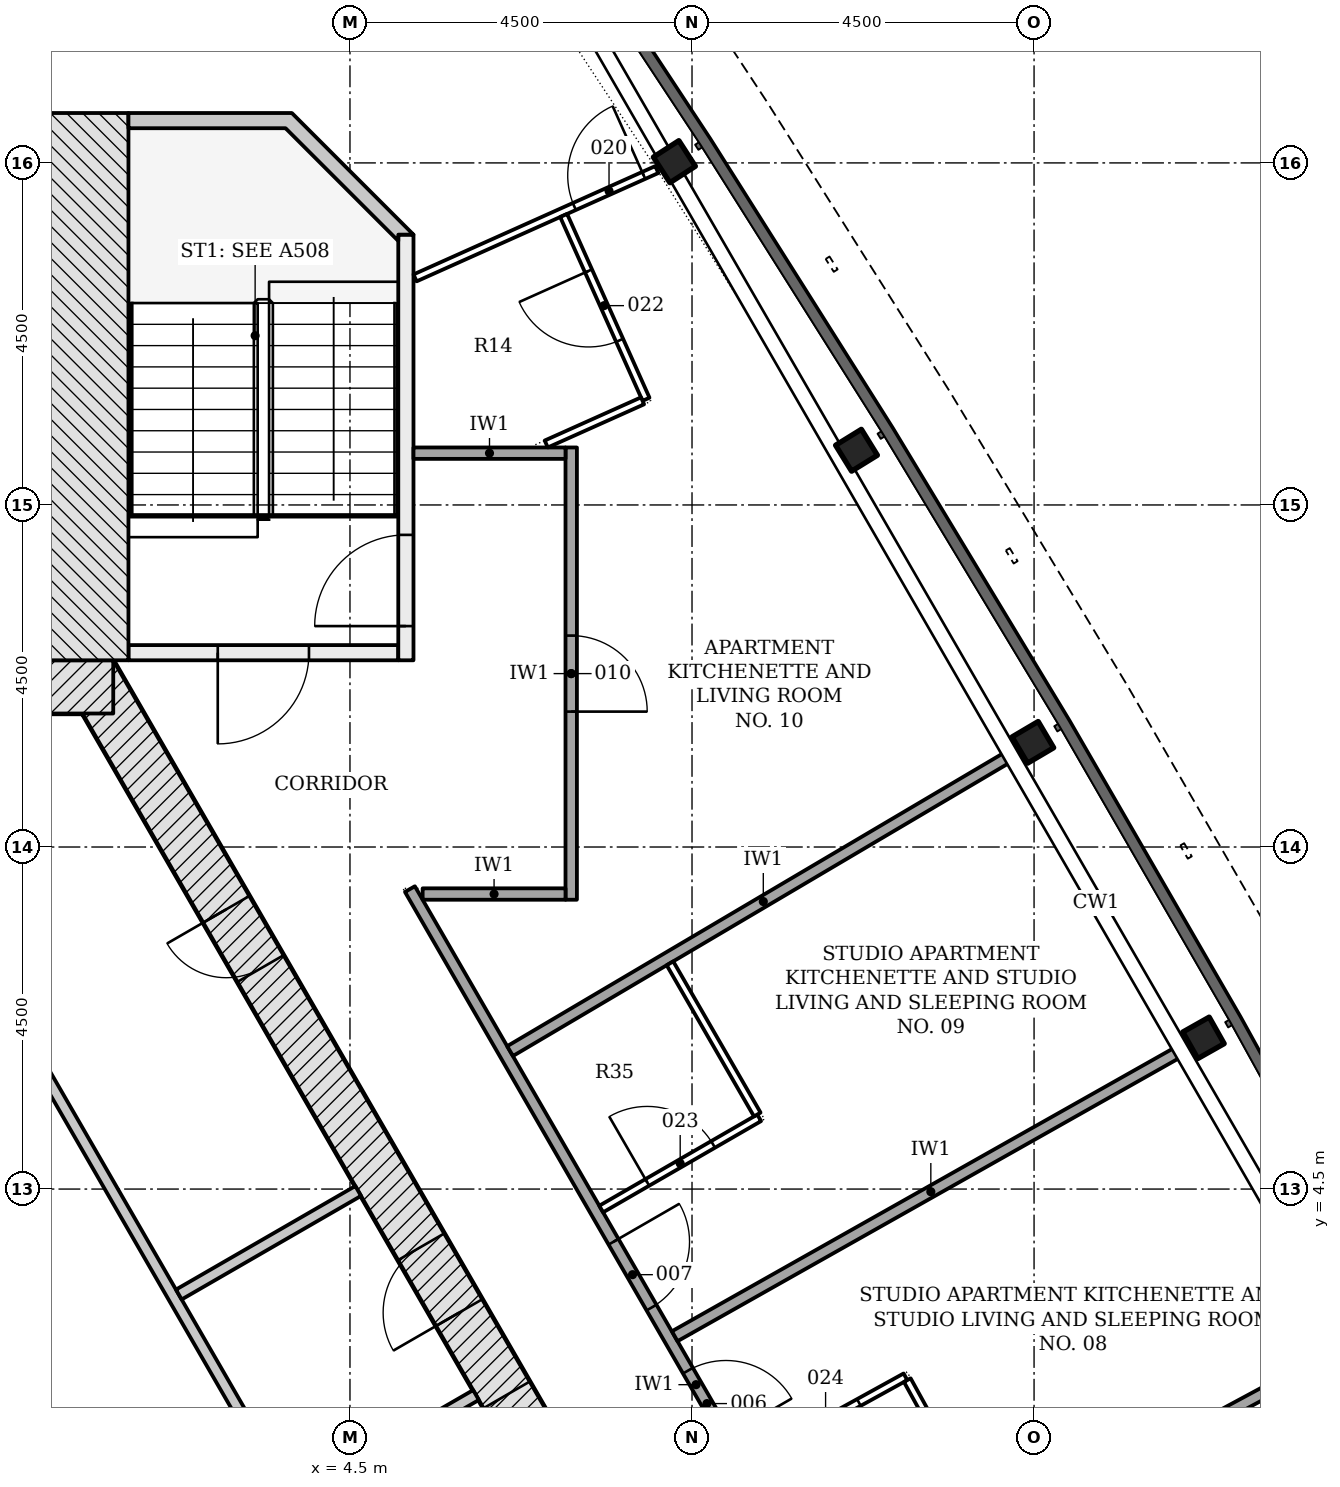
"""IFC4 building model, lengths in metres.
Left out: names, types, materials, properties, quantities, classifications, styles, units other than length and angle.
Written with IfcOpenShell. Run it as: python <this file> out.ifc"""

import sys

from ifc_helpers import new_model, si_unit, direction, frame, frame_2d, origin, origin_2d, place, context, subcontext, project, spatial, polyline, rectangle, i_section, outline, extrude, element, fill, save


model = new_model("IFC4")
c1 = context("Model", 3, precision=1e-05, world=origin(), true_north=direction((0.0, 1.0)))
c2 = subcontext(c1, "Body", "Model", "MODEL_VIEW")
j1 = project(units=[si_unit("LENGTHUNIT", "METRE"), si_unit("PLANEANGLEUNIT", "RADIAN")], contexts=[c1])
p1 = place(None, origin())
s1 = spatial("IfcSite", under=j1, at=p1, CompositionType="ELEMENT")
p2 = place(p1, origin())
s2 = spatial("IfcBuilding", under=s1, at=p2, CompositionType="ELEMENT")
p3 = place(p2, frame((0.0, 0.0, 98.7)))
s3 = spatial("IfcBuildingStorey", under=s2, at=p3, CompositionType="ELEMENT", Elevation=98.7)
p4 = place(p3, frame((10.311, -4.703, -0.2), z_axis=(0.0, 0.0, 1.0), x_axis=(-0.500001446645, 0.866024568562, 0.0)))
e1 = element("IfcWall", 1, at=p4, inside=s3, PredefinedType="SHEAR", context=c2, shape_type="SweptSolid", body=[
    extrude(rectangle(XDim=18.458, YDim=0.7, at=frame_2d((9.229, 0.0))), origin(), (0.0, 0.0, 1.0), 3.6),
])
p5 = place(p4, frame((6.5, 0.0, 0.2)))
e2 = element("IfcOpeningElement", 2, at=p5, cuts=e1, PredefinedType="OPENING", context=c2, shape_type="SweptSolid", body=[
    extrude(rectangle(XDim=1.0, YDim=2.1, at=frame_2d((0.5, 1.05))), frame((0.0, 0.36, 0.0), z_axis=(0.0, -1.0, 0.0), x_axis=(1.0, 0.0, 0.0)), (0.0, 0.0, 1.0), 0.72),
])
p6 = place(p4, frame((2.902, 0.0, 0.2)))
e3 = element("IfcOpeningElement", 3, at=p6, cuts=e1, PredefinedType="OPENING", context=c2, shape_type="SweptSolid", body=[
    extrude(rectangle(XDim=0.9, YDim=2.1, at=frame_2d((0.45, 1.05))), frame((0.0, 0.36, 0.0), z_axis=(0.0, -1.0, 0.0), x_axis=(1.0, 0.0, 0.0)), (0.0, 0.0, 1.0), 0.72),
])
p7 = place(p4, frame((8.75, 0.0, 0.2)))
e4 = element("IfcOpeningElement", 4, at=p7, cuts=e1, PredefinedType="OPENING", context=c2, shape_type="SweptSolid", body=[
    extrude(rectangle(XDim=1.0, YDim=2.1, at=frame_2d((0.5, 1.05))), frame((0.0, 0.36, 0.0), z_axis=(0.0, -1.0, 0.0), x_axis=(1.0, 0.0, 0.0)), (0.0, 0.0, 1.0), 0.72),
])
p8 = place(p4, frame((13.977, 0.0, 0.2)))
e5 = element("IfcOpeningElement", 5, at=p8, cuts=e1, PredefinedType="OPENING", context=c2, shape_type="SweptSolid", body=[
    extrude(rectangle(XDim=0.9, YDim=2.1, at=frame_2d((0.45, 1.05))), frame((0.0, 0.36, 0.0), z_axis=(0.0, -1.0, 0.0), x_axis=(1.0, 0.0, 0.0)), (0.0, 0.0, 1.0), 0.72),
])
p9 = place(p3, frame((1.386, 11.106, -0.2), z_axis=(0.0, 0.0, 1.0), x_axis=(-1.0, 0.0, 0.0)))
e6 = element("IfcWall", 6, at=p9, inside=s3, PredefinedType="SHEAR", context=c2, shape_type="SweptSolid", body=[
    extrude(rectangle(XDim=2.771, YDim=0.7, at=frame_2d((1.386, 0.0))), origin(), (0.0, 0.0, 1.0), 3.6),
])
for number, where, z_axis, x_axis in (
    (7, (15.729, 6.49, -0.2), (0.0, 0.0, 1.0), (-0.491, 0.871, 0.0)),
    (8, (13.484, 10.377, -0.2), (0.0, 0.0, 1.0), (-0.508, 0.861, 0.0)),
    (9, (11.164, 14.22, -0.2), (0.0, 0.0, 1.0), (-0.525, 0.851, 0.0)),
    (10, (8.768, 18.016, -0.2), (0.0, 0.0, 1.0), (-0.542, 0.84, 0.0)),
):
    element("IfcColumn", number, at=place(p3, frame(where, z_axis=z_axis, x_axis=x_axis)), inside=s3, PredefinedType="COLUMN", context=c2, shape_type="SweptSolid", body=[
        extrude(i_section(OverallWidth=0.401, OverallDepth=0.399, WebThickness=0.025, FlangeThickness=0.04, FilletRadius=0.015, at=origin_2d()), origin(), (0.0, 0.0, 1.0), 3.6),
    ])
p10 = place(p3, frame((-2.854, -3.413, 0.0), z_axis=(0.0, 0.0, 1.0), x_axis=(0.866030102318, 0.499991861813, 0.0)))
e11 = element("IfcWall", 11, at=p10, inside=s3, PredefinedType="PARTITIONING", context=c2, shape_type="SweptSolid", body=[
    extrude(rectangle(XDim=10.407, YDim=0.15, at=frame_2d((5.204, 0.0))), origin(), (0.0, 0.0, 1.0), 3.4),
])
p11 = place(p10, frame((3.354, 0.0, 0.0)))
e12 = element("IfcOpeningElement", 12, at=p11, cuts=e11, PredefinedType="OPENING", context=c2, shape_type="SweptSolid", body=[
    extrude(rectangle(XDim=0.9, YDim=2.1, at=frame_2d((0.45, 1.05))), frame((0.0, 0.085, 0.0), z_axis=(0.0, -1.0, 0.0), x_axis=(1.0, 0.0, 0.0)), (0.0, 0.0, 1.0), 0.17),
])
p12 = place(p3, frame((3.546, 0.715, 0.0), z_axis=(0.0, 0.0, 1.0), x_axis=(-0.50002895357, 0.866008686788, 0.0)))
e13 = element("IfcWall", 13, at=p12, inside=s3, PredefinedType="PARTITIONING", context=c2, shape_type="SweptSolid", body=[
    extrude(rectangle(XDim=6.642, YDim=0.15, at=frame_2d((3.321, 0.0))), origin(), (0.0, 0.0, 1.0), 3.4),
])
p13 = place(p3, frame((2.248, 3.112, 0.0), z_axis=(0.0, 0.0, 1.0), x_axis=(0.866012511928, 0.500022328685, 0.0)))
e14 = element("IfcWall", 14, at=p13, inside=s3, PredefinedType="PARTITIONING", context=c2, shape_type="SweptSolid", body=[
    extrude(rectangle(XDim=2.725, YDim=0.15, at=frame_2d((1.363, 0.0))), origin(), (0.0, 0.0, 1.0), 3.4),
])
p14 = place(p3, frame((5.135, 11.556, -0.2), z_axis=(0.0, 0.0, 1.0), x_axis=(-1.0, 0.0, 0.0)))
e15 = element("IfcWall", 15, at=p14, inside=s3, PredefinedType="SHEAR", context=c2, shape_type="SweptSolid", body=[
    extrude(rectangle(XDim=3.55, YDim=0.2, at=frame_2d((1.775, 0.0))), origin(), (0.0, 0.0, 1.0), 3.6),
])
p15 = place(p14, frame((1.175, 0.0, 0.2)))
e16 = element("IfcOpeningElement", 16, at=p15, cuts=e15, PredefinedType="OPENING", context=c2, shape_type="SweptSolid", body=[
    extrude(rectangle(XDim=1.2, YDim=2.1, at=frame_2d((0.6, 1.05))), frame((0.0, 0.11, 0.0), z_axis=(0.0, -1.0, 0.0), x_axis=(1.0, 0.0, 0.0)), (0.0, 0.0, 1.0), 0.22),
])
p16 = place(p3, frame((5.236, 11.456, -0.2), z_axis=(0.0, 0.0, 1.0), x_axis=(0.0, 1.0, 0.0)))
e17 = element("IfcWall", 17, at=p16, inside=s3, PredefinedType="SHEAR", context=c2, shape_type="SweptSolid", body=[
    extrude(rectangle(XDim=5.6, YDim=0.2, at=frame_2d((2.8, 0.0))), origin(), (0.0, 0.0, 1.0), 3.6),
])
p17 = place(p16, frame((0.45, 0.0, 0.2)))
e18 = element("IfcOpeningElement", 18, at=p17, cuts=e17, PredefinedType="OPENING", context=c2, shape_type="SweptSolid", body=[
    extrude(rectangle(XDim=1.2, YDim=2.1, at=frame_2d((0.6, 1.05))), frame((0.0, 0.11, 0.0), z_axis=(0.0, -1.0, 0.0), x_axis=(1.0, 0.0, 0.0)), (0.0, 0.0, 1.0), 0.22),
])
p18 = place(p3, frame((0.993, 11.456, -0.2), z_axis=(0.0, 0.0, 1.0), x_axis=(0.0, 1.0, 0.0)))
e19 = element("IfcWall", 19, at=p18, inside=s3, PredefinedType="SHEAR", context=c2, shape_type="SweptSolid", body=[
    extrude(rectangle(XDim=7.2, YDim=1.186, at=frame_2d((3.6, 0.0))), origin(), (0.0, 0.0, 1.0), 3.6),
])
p19 = place(p3, frame((0.0, 0.0, -0.2)))
e20 = element("IfcWall", 20, at=p19, inside=s3, PredefinedType="SHEAR", context=c2, shape_type="SweptSolid", body=[
    extrude(outline(polyline([(5.336, 17.056), (3.736, 18.656), (1.586, 18.656), (1.586, 18.456), (3.653, 18.456), (5.135, 16.974), (5.135, 17.056), (5.135, 17.056), (5.135, 17.056), (5.135, 17.056), (5.135, 17.056), (5.135, 17.056), (5.135, 17.056), (5.135, 17.056), (5.135, 17.056), (5.135, 17.056), (5.135, 17.056), (5.135, 17.056), (5.135, 17.056), (5.135, 17.056), (5.135, 17.056), (5.135, 17.056), (5.135, 17.056), (5.336, 17.056)])), origin(), (0.0, 0.0, 1.0), 3.6),
])
p20 = place(p3, frame((5.289, 8.446, 0.0), z_axis=(0.0, 0.0, 1.0), x_axis=(0.499996620721, -0.866027354803, 0.0)))
e21 = element("IfcWall", 21, at=p20, inside=s3, PredefinedType="PARTITIONING", context=c2, shape_type="SweptSolid", body=[
    extrude(rectangle(XDim=15.057, YDim=0.15, at=frame_2d((7.528, 0.0))), origin(), (0.0, 0.0, 1.0), 2.778),
])
p21 = place(p20, frame((12.566, 0.0, 0.0)))
e22 = element("IfcOpeningElement", 22, at=p21, cuts=e21, PredefinedType="OPENING", context=c2, shape_type="SweptSolid", body=[
    extrude(rectangle(XDim=1.0, YDim=2.1, at=frame_2d((0.5, 1.05))), frame((0.0, 0.085, 0.0), z_axis=(0.0, -1.0, 0.0), x_axis=(1.0, 0.0, 0.0)), (0.0, 0.0, 1.0), 0.17),
])
p22 = place(p20, frame((7.316, 0.0, 0.0)))
e23 = element("IfcOpeningElement", 23, at=p22, cuts=e21, PredefinedType="OPENING", context=c2, shape_type="SweptSolid", body=[
    extrude(rectangle(XDim=1.0, YDim=2.1, at=frame_2d((0.5, 1.05))), frame((0.0, 0.085, 0.0), z_axis=(0.0, -1.0, 0.0), x_axis=(1.0, 0.0, 0.0)), (0.0, 0.0, 1.0), 0.17),
])
p23 = place(p20, frame((5.357, 0.0, 0.0)))
e24 = element("IfcOpeningElement", 24, at=p23, cuts=e21, PredefinedType="OPENING", context=c2, shape_type="SweptSolid", body=[
    extrude(rectangle(XDim=1.0, YDim=2.1, at=frame_2d((0.5, 1.05))), frame((0.0, 0.085, 0.0), z_axis=(0.0, -1.0, 0.0), x_axis=(1.0, 0.0, 0.0)), (0.0, 0.0, 1.0), 0.17),
])
p24 = place(p3, frame((7.411, 14.256, 0.0), z_axis=(0.0, 0.0, 1.0), x_axis=(0.0, -1.0, 0.0)))
e25 = element("IfcWall", 25, at=p24, inside=s3, PredefinedType="PARTITIONING", context=c2, shape_type="SweptSolid", body=[
    extrude(rectangle(XDim=5.95, YDim=0.15, at=frame_2d((2.975, 0.0))), origin(), (0.0, 0.0, 1.0), 2.778),
])
p25 = place(p24, frame((2.475, 0.0, 0.0)))
e26 = element("IfcOpeningElement", 26, at=p25, cuts=e25, PredefinedType="OPENING", context=c2, shape_type="SweptSolid", body=[
    extrude(rectangle(XDim=1.0, YDim=2.1, at=frame_2d((0.5, 1.05))), frame((0.0, 0.085, 0.0), z_axis=(0.0, -1.0, 0.0), x_axis=(1.0, 0.0, 0.0)), (0.0, 0.0, 1.0), 0.17),
])
p26 = place(p3, frame((5.336, 14.181, 0.0), z_axis=(0.0, 0.0, 1.0), x_axis=(1.0, 0.0, 0.0)))
e27 = element("IfcWall", 27, at=p26, inside=s3, PredefinedType="PARTITIONING", context=c2, shape_type="SweptSolid", body=[
    extrude(rectangle(XDim=2.0, YDim=0.15, at=frame_2d((1.0, 0.0))), origin(), (0.0, 0.0, 1.0), 3.4),
])
p27 = place(p3, frame((5.456, 8.381, 0.0), z_axis=(0.0, 0.0, 1.0), x_axis=(1.0, 0.0, 0.0)))
e28 = element("IfcWall", 28, at=p27, inside=s3, PredefinedType="PARTITIONING", context=c2, shape_type="SweptSolid", body=[
    extrude(rectangle(XDim=1.88, YDim=0.15, at=frame_2d((0.94, 0.0))), origin(), (0.0, 0.0, 1.0), 3.4),
])
p28 = place(p3, frame((15.511, 6.366, 0.0), z_axis=(0.0, 0.0, 1.0), x_axis=(-0.870902291502, -0.491456202175, 0.0)))
e29 = element("IfcWall", 29, at=p28, inside=s3, PredefinedType="PARTITIONING", context=c2, shape_type="SweptSolid", body=[
    extrude(rectangle(XDim=7.738, YDim=0.15, at=frame_2d((3.869, 0.0))), origin(), (0.0, 0.0, 1.0), 2.778),
])
p29 = place(p3, frame((13.269, 10.25, 0.0), z_axis=(0.0, 0.0, 1.0), x_axis=(-0.861057776749, -0.508507133775, 0.0)))
e30 = element("IfcWall", 30, at=p29, inside=s3, PredefinedType="PARTITIONING", context=c2, shape_type="SweptSolid", body=[
    extrude(rectangle(XDim=7.738, YDim=0.15, at=frame_2d((3.869, 0.0))), origin(), (0.0, 0.0, 1.0), 2.778),
])
p30 = place(p3, frame((17.677, 2.44, 0.0), z_axis=(0.0, 0.0, 1.0), x_axis=(-0.880400392736, -0.47423111293, 0.0)))
e31 = element("IfcWall", 31, at=p30, inside=s3, PredefinedType="PARTITIONING", context=c2, shape_type="SweptSolid", body=[
    extrude(rectangle(XDim=7.651, YDim=0.15, at=frame_2d((3.826, 0.0))), origin(), (0.0, 0.0, 1.0), 2.778),
])
p31 = place(p3, frame((5.356, 16.487, 0.0), z_axis=(0.0, 0.0, 1.0), x_axis=(0.912565214453, 0.408931203713, 0.0)))
e32 = element("IfcWall", 32, at=p31, inside=s3, PredefinedType="PARTITIONING", context=c2, shape_type="SweptSolid", body=[
    extrude(rectangle(XDim=3.485, YDim=0.1, at=frame_2d((1.743, 0.0))), origin(), (0.0, 0.0, 1.0), 2.974),
])
p32 = place(p31, frame((2.297, 0.0, 0.0)))
e33 = element("IfcOpeningElement", 33, at=p32, cuts=e32, PredefinedType="OPENING", context=c2, shape_type="SweptSolid", body=[
    extrude(rectangle(XDim=1.0, YDim=2.1, at=frame_2d((0.5, 1.05))), frame((0.0, 0.06, 0.0), z_axis=(0.0, -1.0, 0.0), x_axis=(1.0, 0.0, 0.0)), (0.0, 0.0, 1.0), 0.12),
])
p33 = place(p3, frame((8.395, 14.89, 0.0), z_axis=(0.0, 0.0, 1.0), x_axis=(-0.408965961138, 0.912549638448, 0.0)))
e34 = element("IfcWall", 34, at=p33, inside=s3, PredefinedType="PARTITIONING", context=c2, shape_type="SweptSolid", body=[
    extrude(rectangle(XDim=2.65, YDim=0.1, at=frame_2d((1.325, 0.0))), origin(), (0.0, 0.0, 1.0), 2.974),
])
p34 = place(p33, frame((0.85, 0.0, 0.0)))
e35 = element("IfcOpeningElement", 35, at=p34, cuts=e34, PredefinedType="OPENING", context=c2, shape_type="SweptSolid", body=[
    extrude(rectangle(XDim=1.0, YDim=2.1, at=frame_2d((0.5, 1.05))), frame((0.0, 0.06, 0.0), z_axis=(0.0, -1.0, 0.0), x_axis=(1.0, 0.0, 0.0)), (0.0, 0.0, 1.0), 0.12),
])
p35 = place(p3, frame((7.805, 4.237, 0.0), z_axis=(0.0, 0.0, 1.0), x_axis=(0.866006032174, 0.500033551112, 0.0)))
e36 = element("IfcWall", 36, at=p35, inside=s3, PredefinedType="PARTITIONING", context=c2, shape_type="SweptSolid", body=[
    extrude(rectangle(XDim=2.4, YDim=0.1, at=frame_2d((1.2, 0.0))), origin(), (0.0, 0.0, 1.0), 3.4),
])
p36 = place(p35, frame((0.7, 0.0, 0.0)))
e37 = element("IfcOpeningElement", 37, at=p36, cuts=e36, PredefinedType="OPENING", context=c2, shape_type="SweptSolid", body=[
    extrude(rectangle(XDim=1.0, YDim=2.1, at=frame_2d((0.5, 1.05))), frame((0.0, 0.06, 0.0), z_axis=(0.0, -1.0, 0.0), x_axis=(1.0, 0.0, 0.0)), (0.0, 0.0, 1.0), 0.12),
])
p37 = place(p3, frame((11.808, 2.03, 0.0), z_axis=(0.0, 0.0, 1.0), x_axis=(-0.875678647011, -0.482894302275, 0.0)))
e38 = element("IfcWall", 38, at=p37, inside=s3, PredefinedType="PARTITIONING", context=c2, shape_type="SweptSolid", body=[
    extrude(rectangle(XDim=2.363, YDim=0.1, at=frame_2d((1.181, 0.0))), origin(), (0.0, 0.0, 1.0), 3.4),
])
p38 = place(p37, frame((0.7, 0.0, 0.0)))
e39 = element("IfcOpeningElement", 39, at=p38, cuts=e38, PredefinedType="OPENING", context=c2, shape_type="SweptSolid", body=[
    extrude(rectangle(XDim=1.0, YDim=2.1, at=frame_2d((0.5, 1.05))), frame((0.0, 0.06, 0.0), z_axis=(0.0, -1.0, 0.0), x_axis=(1.0, 0.0, 0.0)), (0.0, 0.0, 1.0), 0.12),
])
p39 = place(p3, frame((12.941, -0.025, 0.0), z_axis=(0.0, 0.0, 1.0), x_axis=(-0.482860975889, 0.875697024069, 0.0)))
e40 = element("IfcWall", 40, at=p39, inside=s3, PredefinedType="PARTITIONING", context=c2, shape_type="SweptSolid", body=[
    extrude(rectangle(XDim=2.297, YDim=0.1, at=frame_2d((1.148, 0.0))), origin(), (0.0, 0.0, 1.0), 2.778),
])
p40 = place(p3, frame((8.71, 7.47, 0.0), z_axis=(0.0, 0.0, 1.0), x_axis=(0.499980071345, -0.866036909293, 0.0)))
e41 = element("IfcWall", 41, at=p40, inside=s3, PredefinedType="PARTITIONING", context=c2, shape_type="SweptSolid", body=[
    extrude(rectangle(XDim=2.297, YDim=0.1, at=frame_2d((1.148, 0.0))), origin(), (0.0, 0.0, 1.0), 2.778),
])
p41 = place(p3, frame((7.082, 14.302, 0.0), z_axis=(0.0, 0.0, 1.0), x_axis=(0.912545530992, 0.408975126221, 0.0)))
e42 = element("IfcWall", 42, at=p41, inside=s3, PredefinedType="PARTITIONING", context=c2, shape_type="SweptSolid", body=[
    extrude(rectangle(XDim=1.388, YDim=0.1, at=frame_2d((0.694, 0.0))), origin(), (0.0, 0.0, 1.0), 3.4),
])
p42 = place(p5, origin())
e43 = element("IfcDoor", 43, at=p42, inside=s3, OperationType="SINGLE_SWING_LEFT", PredefinedType="DOOR", context=c2, shape_type="SweptSolid", body=[
    extrude(rectangle(XDim=1.0, YDim=2.1, at=frame_2d((0.5, 1.05))), frame((0.0, 0.075, 0.0), z_axis=(0.0, -1.0, 0.0), x_axis=(1.0, 0.0, 0.0)), (0.0, 0.0, 1.0), 0.15),
])
fill(e2, e43)
p43 = place(p7, origin())
e44 = element("IfcDoor", 44, at=p43, inside=s3, OperationType="SINGLE_SWING_LEFT", PredefinedType="DOOR", context=c2, shape_type="SweptSolid", body=[
    extrude(rectangle(XDim=1.0, YDim=2.1, at=frame_2d((0.5, 1.05))), frame((0.0, 0.075, 0.0), z_axis=(0.0, -1.0, 0.0), x_axis=(1.0, 0.0, 0.0)), (0.0, 0.0, 1.0), 0.15),
])
fill(e4, e44)
p44 = place(p8, origin())
e45 = element("IfcDoor", 45, at=p44, inside=s3, OperationType="SINGLE_SWING_RIGHT", PredefinedType="DOOR", context=c2, shape_type="SweptSolid", body=[
    extrude(rectangle(XDim=0.9, YDim=2.1, at=frame_2d((0.45, 1.05))), frame((0.0, 0.075, 0.0), z_axis=(0.0, -1.0, 0.0), x_axis=(1.0, 0.0, 0.0)), (0.0, 0.0, 1.0), 0.15),
])
fill(e5, e45)
p45 = place(p15, origin())
e46 = element("IfcDoor", 46, at=p45, inside=s3, OperationType="SINGLE_SWING_RIGHT", PredefinedType="DOOR", context=c2, shape_type="SweptSolid", body=[
    extrude(rectangle(XDim=1.2, YDim=2.1, at=frame_2d((0.6, 1.05))), frame((0.0, 0.025, 0.0), z_axis=(0.0, -1.0, 0.0), x_axis=(1.0, 0.0, 0.0)), (0.0, 0.0, 1.0), 0.05),
])
fill(e16, e46)
p46 = place(p17, origin())
e47 = element("IfcDoor", 47, at=p46, inside=s3, OperationType="SINGLE_SWING_LEFT", PredefinedType="DOOR", context=c2, shape_type="SweptSolid", body=[
    extrude(rectangle(XDim=1.2, YDim=2.1, at=frame_2d((0.6, 1.05))), frame((0.0, 0.025, 0.0), z_axis=(0.0, -1.0, 0.0), x_axis=(1.0, 0.0, 0.0)), (0.0, 0.0, 1.0), 0.05),
])
fill(e18, e47)
p47 = place(p22, origin())
e48 = element("IfcDoor", 48, at=p47, inside=s3, OperationType="SINGLE_SWING_RIGHT", PredefinedType="DOOR", context=c2, shape_type="SweptSolid", body=[
    extrude(rectangle(XDim=1.0, YDim=2.1, at=frame_2d((0.5, 1.05))), frame((0.0, 0.025, 0.0), z_axis=(0.0, -1.0, 0.0), x_axis=(1.0, 0.0, 0.0)), (0.0, 0.0, 1.0), 0.05),
])
fill(e23, e48)
p48 = place(p23, origin())
e49 = element("IfcDoor", 49, at=p48, inside=s3, OperationType="SINGLE_SWING_LEFT", PredefinedType="DOOR", context=c2, shape_type="SweptSolid", body=[
    extrude(rectangle(XDim=1.0, YDim=2.1, at=frame_2d((0.5, 1.05))), frame((0.0, 0.025, 0.0), z_axis=(0.0, -1.0, 0.0), x_axis=(1.0, 0.0, 0.0)), (0.0, 0.0, 1.0), 0.05),
])
fill(e24, e49)
p49 = place(p25, origin())
e50 = element("IfcDoor", 50, at=p49, inside=s3, OperationType="SINGLE_SWING_RIGHT", PredefinedType="DOOR", context=c2, shape_type="SweptSolid", body=[
    extrude(rectangle(XDim=1.0, YDim=2.1, at=frame_2d((0.5, 1.05))), frame((0.0, 0.025, 0.0), z_axis=(0.0, -1.0, 0.0), x_axis=(1.0, 0.0, 0.0)), (0.0, 0.0, 1.0), 0.05),
])
fill(e26, e50)
p50 = place(p32, origin())
e51 = element("IfcDoor", 51, at=p50, inside=s3, OperationType="SINGLE_SWING_RIGHT", PredefinedType="DOOR", context=c2, shape_type="SweptSolid", body=[
    extrude(rectangle(XDim=1.0, YDim=2.1, at=frame_2d((0.5, 1.05))), frame((0.0, 0.025, 0.0), z_axis=(0.0, -1.0, 0.0), x_axis=(1.0, 0.0, 0.0)), (0.0, 0.0, 1.0), 0.05),
])
fill(e33, e51)
p51 = place(p34, origin())
e52 = element("IfcDoor", 52, at=p51, inside=s3, OperationType="SINGLE_SWING_RIGHT", PredefinedType="DOOR", context=c2, shape_type="SweptSolid", body=[
    extrude(rectangle(XDim=1.0, YDim=2.1, at=frame_2d((0.5, 1.05))), frame((0.0, 0.025, 0.0), z_axis=(0.0, -1.0, 0.0), x_axis=(1.0, 0.0, 0.0)), (0.0, 0.0, 1.0), 0.05),
])
fill(e35, e52)
p52 = place(p36, origin())
e53 = element("IfcDoor", 53, at=p52, inside=s3, OperationType="SINGLE_SWING_LEFT", PredefinedType="DOOR", context=c2, shape_type="SweptSolid", body=[
    extrude(rectangle(XDim=1.0, YDim=2.1, at=frame_2d((0.5, 1.05))), frame((0.0, 0.025, 0.0), z_axis=(0.0, -1.0, 0.0), x_axis=(1.0, 0.0, 0.0)), (0.0, 0.0, 1.0), 0.05),
])
fill(e37, e53)
p53 = place(p38, origin())
e54 = element("IfcDoor", 54, at=p53, inside=s3, OperationType="SINGLE_SWING_RIGHT", PredefinedType="DOOR", context=c2, shape_type="SweptSolid", body=[
    extrude(rectangle(XDim=1.0, YDim=2.1, at=frame_2d((0.5, 1.05))), frame((0.0, 0.025, 0.0), z_axis=(0.0, -1.0, 0.0), x_axis=(1.0, 0.0, 0.0)), (0.0, 0.0, 1.0), 0.05),
])
fill(e39, e54)
save(model, sys.argv[1])
